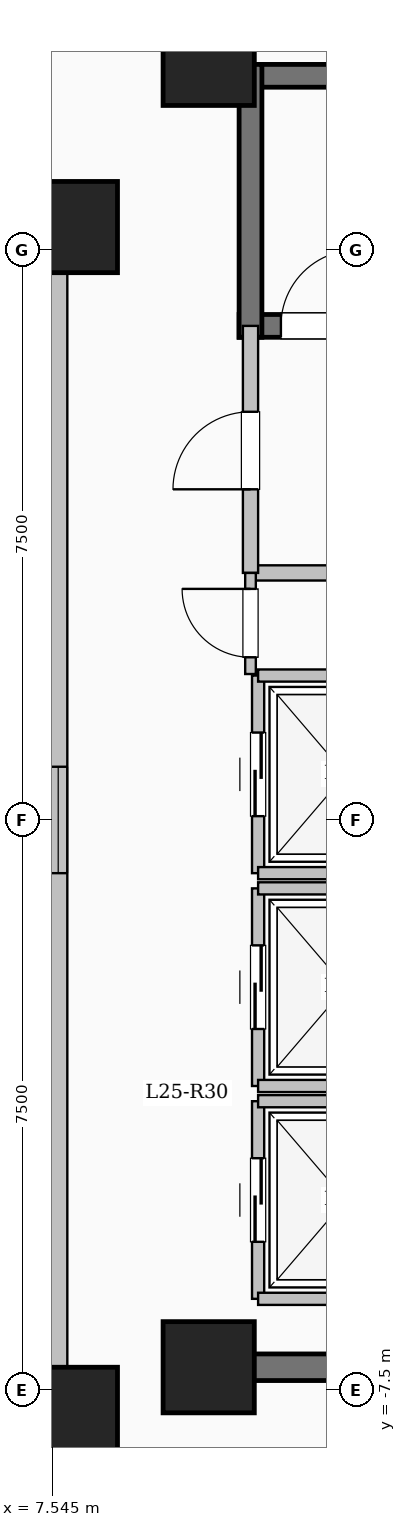
"""IFC4 building model, lengths in metres.
Left out: names, types, materials, properties, quantities, classifications, styles, units other than length and angle.
Written with IfcOpenShell. Run it as: python <this file> out.ifc"""

import sys

from ifc_helpers import new_model, si_unit, direction, frame, frame_2d, origin, origin_2d, place, context, subcontext, project, spatial, rectangle, extrude, element, fill, save


model = new_model("IFC4")
c1 = context("Model", 3, precision=1e-05, world=origin(), true_north=direction((0.0, 1.0)))
c2 = subcontext(c1, "Body", "Model", "MODEL_VIEW")
j1 = project(units=[si_unit("LENGTHUNIT", "METRE"), si_unit("PLANEANGLEUNIT", "RADIAN")], contexts=[c1])
p1 = place(None, origin())
s1 = spatial("IfcSite", under=j1, at=p1, CompositionType="ELEMENT")
p2 = place(p1, origin())
s2 = spatial("IfcBuilding", under=s1, at=p2, CompositionType="ELEMENT")
p3 = place(p2, frame((0.0, 0.0, 95.05)))
s3 = spatial("IfcBuildingStorey", under=s2, at=p3, CompositionType="ELEMENT", Elevation=95.05)
for number, where, z_axis, x_axis in (
    (1, (7.8, -7.8, 0.0), (0.0, 0.0, 1.0), (1.0, 0.0, 0.0)),
    (2, (7.8, 7.8, 0.0), (0.0, 0.0, 1.0), (1.0, 0.0, 0.0)),
    (3, (9.6, -7.2, 0.0), (0.0, 0.0, 1.0), (1.0, 0.0, 0.0)),
    (4, (9.6, 10.0, 0.0), (0.0, 0.0, 1.0), (1.0, 0.0, 0.0)),
):
    element("IfcColumn", number, at=place(p3, frame(where, z_axis=z_axis, x_axis=x_axis)), inside=s3, PredefinedType="COLUMN", context=c2, shape_type="SweptSolid", body=[
        extrude(rectangle(XDim=1.2, YDim=1.2, at=origin_2d()), origin(), (0.0, 0.0, 1.0), 3.35),
    ])
p4 = place(p3, frame((-7.62, -7.62, 0.0), z_axis=(0.0, 0.0, 1.0), x_axis=(1.0, 0.0, 0.0)))
e5 = element("IfcWall", 5, at=p4, inside=s3, PredefinedType="SOLIDWALL", context=c2, shape_type="SweptSolid", body=[
    extrude(rectangle(XDim=15.24, YDim=0.24, at=frame_2d((7.62, 0.0))), origin(), (0.0, 0.0, 1.0), 3.1),
])
p5 = place(p4, frame((6.92, 0.0, 0.95)))
e6 = element("IfcOpeningElement", 6, at=p5, cuts=e5, PredefinedType="OPENING", context=c2, shape_type="SweptSolid", body=[
    extrude(rectangle(XDim=1.4, YDim=1.5, at=frame_2d((0.7, 0.75))), frame((0.0, 0.13, 0.0), z_axis=(0.0, -1.0, 0.0), x_axis=(1.0, 0.0, 0.0)), (0.0, 0.0, 1.0), 0.26),
])
p6 = place(p3, frame((7.62, -7.62, 0.0), z_axis=(0.0, 0.0, 1.0), x_axis=(0.0, 1.0, 0.0)))
e7 = element("IfcWall", 7, at=p6, inside=s3, PredefinedType="SOLIDWALL", context=c2, shape_type="SweptSolid", body=[
    extrude(rectangle(XDim=15.24, YDim=0.24, at=frame_2d((7.62, 0.0))), origin(), (0.0, 0.0, 1.0), 3.1),
])
p7 = place(p6, frame((6.92, 0.0, 0.95)))
e8 = element("IfcOpeningElement", 8, at=p7, cuts=e7, PredefinedType="OPENING", context=c2, shape_type="SweptSolid", body=[
    extrude(rectangle(XDim=1.4, YDim=1.5, at=frame_2d((0.7, 0.75))), frame((0.0, 0.13, 0.0), z_axis=(0.0, -1.0, 0.0), x_axis=(1.0, 0.0, 0.0)), (0.0, 0.0, 1.0), 0.26),
])
p8 = place(p3, frame((7.62, 7.62, 0.0), z_axis=(0.0, 0.0, 1.0), x_axis=(-1.0, 0.0, 0.0)))
e9 = element("IfcWall", 9, at=p8, inside=s3, PredefinedType="SOLIDWALL", context=c2, shape_type="SweptSolid", body=[
    extrude(rectangle(XDim=15.24, YDim=0.24, at=frame_2d((7.62, 0.0))), origin(), (0.0, 0.0, 1.0), 3.1),
])
p9 = place(p8, frame((6.92, 0.0, 0.95)))
e10 = element("IfcOpeningElement", 10, at=p9, cuts=e9, PredefinedType="OPENING", context=c2, shape_type="SweptSolid", body=[
    extrude(rectangle(XDim=1.4, YDim=1.5, at=frame_2d((0.7, 0.75))), frame((0.0, 0.13, 0.0), z_axis=(0.0, -1.0, 0.0), x_axis=(1.0, 0.0, 0.0)), (0.0, 0.0, 1.0), 0.26),
])
p10 = place(p3, frame((10.0, 9.79, 0.0), z_axis=(0.0, 0.0, 1.0), x_axis=(1.0, 0.0, 0.0)))
e11 = element("IfcWall", 11, at=p10, inside=s3, PredefinedType="SHEAR", context=c2, shape_type="SweptSolid", body=[
    extrude(rectangle(XDim=8.0, YDim=0.3, at=frame_2d((4.0, 0.0))), origin(), (0.0, 0.0, 1.0), 3.35),
])
p11 = place(p3, frame((10.0, 6.5, 0.0), z_axis=(0.0, 0.0, 1.0), x_axis=(1.0, 0.0, 0.0)))
e12 = element("IfcWall", 12, at=p11, inside=s3, PredefinedType="SHEAR", context=c2, shape_type="SweptSolid", body=[
    extrude(rectangle(XDim=8.0, YDim=0.3, at=frame_2d((4.0, 0.0))), origin(), (0.0, 0.0, 1.0), 3.35),
])
p12 = place(p11, frame((0.55, 0.0, 0.0)))
e13 = element("IfcOpeningElement", 13, at=p12, cuts=e12, PredefinedType="OPENING", context=c2, shape_type="SweptSolid", body=[
    extrude(rectangle(XDim=1.0, YDim=2.15, at=frame_2d((0.5, 1.075))), frame((0.0, 0.16, 0.0), z_axis=(0.0, -1.0, 0.0), x_axis=(1.0, 0.0, 0.0)), (0.0, 0.0, 1.0), 0.32),
])
p13 = place(p3, frame((10.15, 6.35, 0.0), z_axis=(0.0, 0.0, 1.0), x_axis=(0.0, 1.0, 0.0)))
e14 = element("IfcWall", 14, at=p13, inside=s3, PredefinedType="SHEAR", context=c2, shape_type="SweptSolid", body=[
    extrude(rectangle(XDim=3.59, YDim=0.3, at=frame_2d((1.795, 0.0))), origin(), (0.0, 0.0, 1.0), 3.35),
])
p14 = place(p3, frame((10.15, 3.25, 0.0), z_axis=(0.0, 0.0, 1.0), x_axis=(1.0, 0.0, 0.0)))
e15 = element("IfcWall", 15, at=p14, inside=s3, PredefinedType="SOLIDWALL", context=c2, shape_type="SweptSolid", body=[
    extrude(rectangle(XDim=5.4, YDim=0.2, at=frame_2d((2.7, 0.0))), origin(), (0.0, 0.0, 1.0), 3.1),
])
p15 = place(p3, frame((10.15, 3.25, 0.0), z_axis=(0.0, 0.0, 1.0), x_axis=(0.0, 1.0, 0.0)))
e16 = element("IfcWall", 16, at=p15, inside=s3, PredefinedType="SOLIDWALL", context=c2, shape_type="SweptSolid", body=[
    extrude(rectangle(XDim=3.25, YDim=0.2, at=frame_2d((1.625, 0.0))), origin(), (0.0, 0.0, 1.0), 3.1),
])
p16 = place(p15, frame((1.1, 0.0, 0.0)))
e17 = element("IfcOpeningElement", 17, at=p16, cuts=e16, PredefinedType="OPENING", context=c2, shape_type="SweptSolid", body=[
    extrude(rectangle(XDim=1.02, YDim=2.15, at=frame_2d((0.51, 1.075))), frame((0.0, 0.11, 0.0), z_axis=(0.0, -1.0, 0.0), x_axis=(1.0, 0.0, 0.0)), (0.0, 0.0, 1.0), 0.22),
])
p17 = place(p3, frame((10.25, -6.3, 0.0), z_axis=(0.0, 0.0, 1.0), x_axis=(0.0, 1.0, 0.0)))
e18 = element("IfcWall", 18, at=p17, inside=s3, PredefinedType="SOLIDWALL", context=c2, shape_type="SweptSolid", body=[
    extrude(rectangle(XDim=2.6, YDim=0.16, at=frame_2d((1.3, 0.0))), origin(), (0.0, 0.0, 1.0), 3.1),
])
p18 = place(p17, frame((0.75, 0.0, 0.0)))
e19 = element("IfcOpeningElement", 19, at=p18, cuts=e18, PredefinedType="OPENING", context=c2, shape_type="SweptSolid", body=[
    extrude(rectangle(XDim=1.1, YDim=2.15, at=frame_2d((0.55, 1.075))), frame((0.0, 0.09, 0.0), z_axis=(0.0, -1.0, 0.0), x_axis=(1.0, 0.0, 0.0)), (0.0, 0.0, 1.0), 0.18),
])
for number, where, z_axis, x_axis in (
    (20, (10.25, -6.3, 0.0), (0.0, 0.0, 1.0), (1.0, 0.0, 0.0)),
    (21, (10.25, -3.7, 0.0), (0.0, 0.0, 1.0), (1.0, 0.0, 0.0)),
):
    element("IfcWall", number, at=place(p3, frame(where, z_axis=z_axis, x_axis=x_axis)), inside=s3, PredefinedType="SOLIDWALL", context=c2, shape_type="SweptSolid", body=[
        extrude(rectangle(XDim=2.3, YDim=0.16, at=frame_2d((1.15, 0.0))), origin(), (0.0, 0.0, 1.0), 3.1),
    ])
p19 = place(p3, frame((10.25, -3.5, 0.0), z_axis=(0.0, 0.0, 1.0), x_axis=(0.0, 1.0, 0.0)))
e22 = element("IfcWall", 22, at=p19, inside=s3, PredefinedType="SOLIDWALL", context=c2, shape_type="SweptSolid", body=[
    extrude(rectangle(XDim=2.6, YDim=0.16, at=frame_2d((1.3, 0.0))), origin(), (0.0, 0.0, 1.0), 3.1),
])
p20 = place(p19, frame((0.75, 0.0, 0.0)))
e23 = element("IfcOpeningElement", 23, at=p20, cuts=e22, PredefinedType="OPENING", context=c2, shape_type="SweptSolid", body=[
    extrude(rectangle(XDim=1.1, YDim=2.15, at=frame_2d((0.55, 1.075))), frame((0.0, 0.09, 0.0), z_axis=(0.0, -1.0, 0.0), x_axis=(1.0, 0.0, 0.0)), (0.0, 0.0, 1.0), 0.18),
])
for number, where, z_axis, x_axis in (
    (24, (10.25, -3.5, 0.0), (0.0, 0.0, 1.0), (1.0, 0.0, 0.0)),
    (25, (10.25, -0.9, 0.0), (0.0, 0.0, 1.0), (1.0, 0.0, 0.0)),
):
    element("IfcWall", number, at=place(p3, frame(where, z_axis=z_axis, x_axis=x_axis)), inside=s3, PredefinedType="SOLIDWALL", context=c2, shape_type="SweptSolid", body=[
        extrude(rectangle(XDim=2.3, YDim=0.16, at=frame_2d((1.15, 0.0))), origin(), (0.0, 0.0, 1.0), 3.1),
    ])
p21 = place(p3, frame((10.25, -0.7, 0.0), z_axis=(0.0, 0.0, 1.0), x_axis=(0.0, 1.0, 0.0)))
e26 = element("IfcWall", 26, at=p21, inside=s3, PredefinedType="SOLIDWALL", context=c2, shape_type="SweptSolid", body=[
    extrude(rectangle(XDim=2.6, YDim=0.16, at=frame_2d((1.3, 0.0))), origin(), (0.0, 0.0, 1.0), 3.1),
])
p22 = place(p21, frame((0.75, 0.0, 0.0)))
e27 = element("IfcOpeningElement", 27, at=p22, cuts=e26, PredefinedType="OPENING", context=c2, shape_type="SweptSolid", body=[
    extrude(rectangle(XDim=1.1, YDim=2.15, at=frame_2d((0.55, 1.075))), frame((0.0, 0.09, 0.0), z_axis=(0.0, -1.0, 0.0), x_axis=(1.0, 0.0, 0.0)), (0.0, 0.0, 1.0), 0.18),
])
for number, where, z_axis, x_axis in (
    (28, (10.25, -0.7, 0.0), (0.0, 0.0, 1.0), (1.0, 0.0, 0.0)),
    (29, (10.25, 1.9, 0.0), (0.0, 0.0, 1.0), (1.0, 0.0, 0.0)),
):
    element("IfcWall", number, at=place(p3, frame(where, z_axis=z_axis, x_axis=x_axis)), inside=s3, PredefinedType="SOLIDWALL", context=c2, shape_type="SweptSolid", body=[
        extrude(rectangle(XDim=2.3, YDim=0.16, at=frame_2d((1.15, 0.0))), origin(), (0.0, 0.0, 1.0), 3.1),
    ])
p23 = place(p3, frame((10.075, -7.2, 0.0), z_axis=(0.0, 0.0, 1.0), x_axis=(1.0, 0.0, 0.0)))
e30 = element("IfcWall", 30, at=p23, inside=s3, PredefinedType="SHEAR", context=c2, shape_type="SweptSolid", body=[
    extrude(rectangle(XDim=8.55, YDim=0.35, at=frame_2d((4.275, 0.0))), origin(), (0.0, 0.0, 1.0), 3.35),
])
p24 = place(p3, frame((10.15, 1.92, 0.0), z_axis=(0.0, 0.0, 1.0), x_axis=(0.0, 1.0, 0.0)))
e31 = element("IfcWall", 31, at=p24, inside=s3, PredefinedType="PARTITIONING", context=c2, shape_type="SweptSolid", body=[
    extrude(rectangle(XDim=1.33, YDim=0.14, at=frame_2d((0.665, 0.0))), origin(), (0.0, 0.0, 1.0), 3.1),
])
p25 = place(p24, frame((0.22, 0.0, 0.0)))
e32 = element("IfcOpeningElement", 32, at=p25, cuts=e31, PredefinedType="OPENING", context=c2, shape_type="SweptSolid", body=[
    extrude(rectangle(XDim=0.9, YDim=2.08, at=frame_2d((0.45, 1.04))), frame((0.0, 0.08, 0.0), z_axis=(0.0, -1.0, 0.0), x_axis=(1.0, 0.0, 0.0)), (0.0, 0.0, 1.0), 0.16),
])
p26 = place(p7, origin())
e33 = element("IfcWindow", 33, at=p26, inside=s3, PartitioningType="SINGLE_PANEL", PredefinedType="WINDOW", context=c2, shape_type="SweptSolid", body=[
    extrude(rectangle(XDim=1.4, YDim=1.5, at=frame_2d((0.7, 0.75))), frame((0.0, 0.03, 0.0), z_axis=(0.0, -1.0, 0.0), x_axis=(1.0, 0.0, 0.0)), (0.0, 0.0, 1.0), 0.06),
])
fill(e8, e33)
p27 = place(p12, origin())
e34 = element("IfcDoor", 34, at=p27, inside=s3, OperationType="SINGLE_SWING_RIGHT", PredefinedType="DOOR", context=c2, shape_type="SweptSolid", body=[
    extrude(rectangle(XDim=1.0, YDim=2.15, at=frame_2d((0.5, 1.075))), frame((0.0, 0.025, 0.0), z_axis=(0.0, -1.0, 0.0), x_axis=(1.0, 0.0, 0.0)), (0.0, 0.0, 1.0), 0.05),
])
fill(e13, e34)
p28 = place(p16, origin())
e35 = element("IfcDoor", 35, at=p28, inside=s3, OperationType="SINGLE_SWING_LEFT", PredefinedType="DOOR", context=c2, shape_type="SweptSolid", body=[
    extrude(rectangle(XDim=1.02, YDim=2.15, at=frame_2d((0.51, 1.075))), frame((0.0, 0.025, 0.0), z_axis=(0.0, -1.0, 0.0), x_axis=(1.0, 0.0, 0.0)), (0.0, 0.0, 1.0), 0.05),
])
fill(e17, e35)
p29 = place(p18, origin())
e36 = element("IfcDoor", 36, at=p29, inside=s3, OperationType="SLIDING_TO_LEFT", PredefinedType="DOOR", context=c2, shape_type="SweptSolid", body=[
    extrude(rectangle(XDim=1.1, YDim=2.15, at=frame_2d((0.55, 1.075))), frame((0.0, 0.025, 0.0), z_axis=(0.0, -1.0, 0.0), x_axis=(1.0, 0.0, 0.0)), (0.0, 0.0, 1.0), 0.05),
])
fill(e19, e36)
p30 = place(p20, origin())
e37 = element("IfcDoor", 37, at=p30, inside=s3, OperationType="SLIDING_TO_LEFT", PredefinedType="DOOR", context=c2, shape_type="SweptSolid", body=[
    extrude(rectangle(XDim=1.1, YDim=2.15, at=frame_2d((0.55, 1.075))), frame((0.0, 0.025, 0.0), z_axis=(0.0, -1.0, 0.0), x_axis=(1.0, 0.0, 0.0)), (0.0, 0.0, 1.0), 0.05),
])
fill(e23, e37)
p31 = place(p22, origin())
e38 = element("IfcDoor", 38, at=p31, inside=s3, OperationType="SLIDING_TO_LEFT", PredefinedType="DOOR", context=c2, shape_type="SweptSolid", body=[
    extrude(rectangle(XDim=1.1, YDim=2.15, at=frame_2d((0.55, 1.075))), frame((0.0, 0.025, 0.0), z_axis=(0.0, -1.0, 0.0), x_axis=(1.0, 0.0, 0.0)), (0.0, 0.0, 1.0), 0.05),
])
fill(e27, e38)
p32 = place(p25, origin())
e39 = element("IfcDoor", 39, at=p32, inside=s3, OperationType="SINGLE_SWING_RIGHT", PredefinedType="DOOR", context=c2, shape_type="SweptSolid", body=[
    extrude(rectangle(XDim=0.9, YDim=2.08, at=frame_2d((0.45, 1.04))), frame((0.0, 0.025, 0.0), z_axis=(0.0, -1.0, 0.0), x_axis=(1.0, 0.0, 0.0)), (0.0, 0.0, 1.0), 0.05),
])
fill(e32, e39)
save(model, sys.argv[1])
